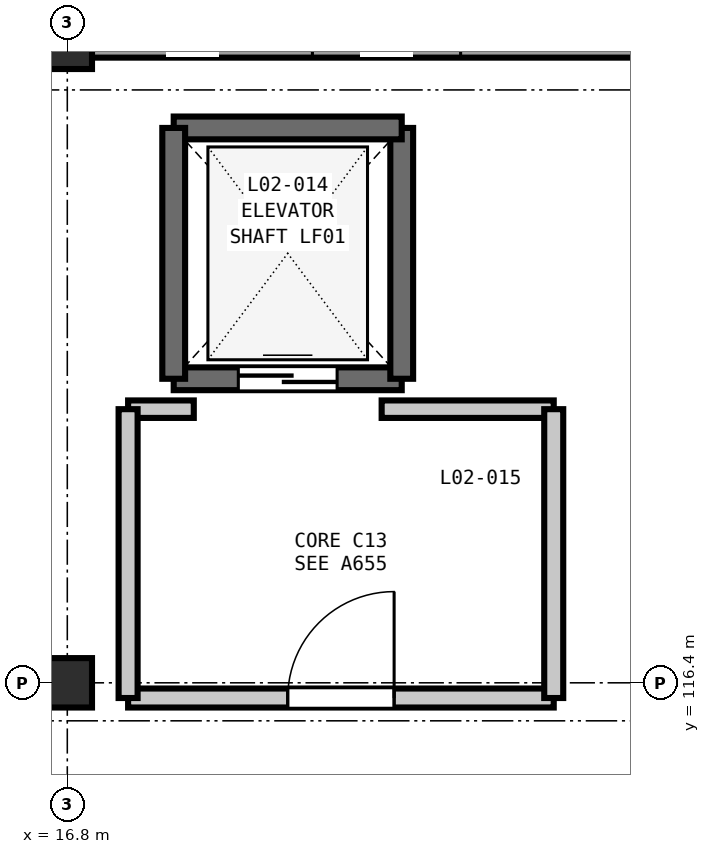
"""IFC4 building model, lengths in metres.
Left out: names, types, materials, properties, quantities, classifications, styles, units other than length and angle.
Written with IfcOpenShell. Run it as: python <this file> out.ifc"""

import sys

from ifc_helpers import new_model, si_unit, direction, frame, frame_2d, origin, origin_2d, place, context, subcontext, project, spatial, rectangle, extrude, element, fill, save


model = new_model("IFC4")
c1 = context("Model", 3, precision=1e-05, world=origin(), true_north=direction((0.0, 1.0)))
c2 = subcontext(c1, "Body", "Model", "MODEL_VIEW")
j1 = project(units=[si_unit("LENGTHUNIT", "METRE"), si_unit("PLANEANGLEUNIT", "RADIAN")], contexts=[c1])
p1 = place(None, origin())
s1 = spatial("IfcSite", under=j1, at=p1, CompositionType="ELEMENT")
p2 = place(p1, origin())
s2 = spatial("IfcBuilding", under=s1, at=p2, CompositionType="ELEMENT")
p3 = place(p2, frame((0.0, 0.0, 10.8)))
s3 = spatial("IfcBuildingStorey", under=s2, at=p3, CompositionType="ELEMENT", Elevation=10.8)
for number, where, z_axis, x_axis in (
    (1, (16.8, 116.4, 0.0), (0.0, 0.0, 1.0), (1.0, 0.0, 0.0)),
    (2, (16.8, 124.8, 0.0), (0.0, 0.0, 1.0), (1.0, 0.0, 0.0)),
):
    element("IfcColumn", number, at=place(p3, frame(where, z_axis=z_axis, x_axis=x_axis)), inside=s3, PredefinedType="COLUMN", context=c2, shape_type="SweptSolid", body=[
        extrude(rectangle(XDim=0.65, YDim=0.65, at=origin_2d()), origin(), (0.0, 0.0, 1.0), 5.4),
    ])
p4 = place(p3, frame((17.123, 124.8, 0.0), z_axis=(0.0, 0.0, 1.0), x_axis=(1.0, 0.0, 0.0)))
e3 = element("IfcWall", 3, at=p4, inside=s3, PredefinedType="SOLIDWALL", context=c2, shape_type="SweptSolid", body=[
    extrude(rectangle(XDim=7.754, YDim=0.35, at=frame_2d((3.877, 0.0))), origin(), (0.0, 0.0, 1.0), 4.68),
])
p5 = place(p4, frame((2.902, 0.0, 0.9)))
e4 = element("IfcOpeningElement", 4, at=p5, cuts=e3, PredefinedType="OPENING", context=c2, shape_type="SweptSolid", body=[
    extrude(rectangle(XDim=1.95, YDim=1.75, at=frame_2d((0.975, 0.875))), frame((0.0, 0.185, 0.0), z_axis=(0.0, -1.0, 0.0), x_axis=(1.0, 0.0, 0.0)), (0.0, 0.0, 1.0), 0.37),
])
p6 = place(p3, frame((18.2, 120.4, 0.0), z_axis=(0.0, 0.0, 1.0), x_axis=(1.0, 0.0, 0.0)))
e5 = element("IfcWall", 5, at=p6, inside=s3, PredefinedType="SHEAR", context=c2, shape_type="SweptSolid", body=[
    extrude(rectangle(XDim=3.0, YDim=0.3, at=frame_2d((1.5, 0.0))), origin(), (0.0, 0.0, 1.0), 5.4),
])
p7 = place(p6, frame((0.85, 0.0, 0.0)))
e6 = element("IfcOpeningElement", 6, at=p7, cuts=e5, PredefinedType="OPENING", context=c2, shape_type="SweptSolid", body=[
    extrude(rectangle(XDim=1.3, YDim=2.2, at=frame_2d((0.65, 1.1))), frame((0.0, 0.16, 0.0), z_axis=(0.0, -1.0, 0.0), x_axis=(1.0, 0.0, 0.0)), (0.0, 0.0, 1.0), 0.32),
])
p8 = place(p3, frame((21.2, 120.4, 0.0), z_axis=(0.0, 0.0, 1.0), x_axis=(0.0, 1.0, 0.0)))
e7 = element("IfcWall", 7, at=p8, inside=s3, PredefinedType="SHEAR", context=c2, shape_type="SweptSolid", body=[
    extrude(rectangle(XDim=3.3, YDim=0.3, at=frame_2d((1.65, 0.0))), origin(), (0.0, 0.0, 1.0), 5.4),
])
p9 = place(p3, frame((21.2, 123.7, 0.0), z_axis=(0.0, 0.0, 1.0), x_axis=(-1.0, 0.0, 0.0)))
e8 = element("IfcWall", 8, at=p9, inside=s3, PredefinedType="SHEAR", context=c2, shape_type="SweptSolid", body=[
    extrude(rectangle(XDim=3.0, YDim=0.3, at=frame_2d((1.5, 0.0))), origin(), (0.0, 0.0, 1.0), 5.4),
])
p10 = place(p3, frame((18.2, 123.7, 0.0), z_axis=(0.0, 0.0, 1.0), x_axis=(0.0, -1.0, 0.0)))
e9 = element("IfcWall", 9, at=p10, inside=s3, PredefinedType="SHEAR", context=c2, shape_type="SweptSolid", body=[
    extrude(rectangle(XDim=3.3, YDim=0.3, at=frame_2d((1.65, 0.0))), origin(), (0.0, 0.0, 1.0), 5.4),
])
p11 = place(p3, frame((17.6, 116.2, 0.0), z_axis=(0.0, 0.0, 1.0), x_axis=(1.0, 0.0, 0.0)))
e10 = element("IfcWall", 10, at=p11, inside=s3, PredefinedType="PARTITIONING", context=c2, shape_type="SweptSolid", body=[
    extrude(rectangle(XDim=5.6, YDim=0.25, at=frame_2d((2.8, 0.0))), origin(), (0.0, 0.0, 1.0), 4.735),
])
p12 = place(p11, frame((2.1, 0.0, 0.0)))
e11 = element("IfcOpeningElement", 11, at=p12, cuts=e10, PredefinedType="OPENING", context=c2, shape_type="SweptSolid", body=[
    extrude(rectangle(XDim=1.4, YDim=2.2, at=frame_2d((0.7, 1.1))), frame((0.0, 0.135, 0.0), z_axis=(0.0, -1.0, 0.0), x_axis=(1.0, 0.0, 0.0)), (0.0, 0.0, 1.0), 0.27),
])
p13 = place(p3, frame((20.936, 120.0, 0.0), z_axis=(0.0, 0.0, 1.0), x_axis=(1.0, 0.0, 0.0)))
e12 = element("IfcWall", 12, at=p13, inside=s3, PredefinedType="PARTITIONING", context=c2, shape_type="SweptSolid", body=[
    extrude(rectangle(XDim=2.264, YDim=0.23, at=frame_2d((1.132, 0.0))), origin(), (0.0, 0.0, 1.0), 5.07),
])
p14 = place(p3, frame((17.6, 120.0, 0.0), z_axis=(0.0, 0.0, 1.0), x_axis=(1.0, 0.0, 0.0)))
e13 = element("IfcWall", 13, at=p14, inside=s3, PredefinedType="PARTITIONING", context=c2, shape_type="SweptSolid", body=[
    extrude(rectangle(XDim=0.864, YDim=0.23, at=frame_2d((0.432, 0.0))), origin(), (0.0, 0.0, 1.0), 5.07),
])
for number, where, z_axis, x_axis in (
    (14, (17.6, 116.2, 0.0), (0.0, 0.0, 1.0), (0.0, 1.0, 0.0)),
    (15, (23.2, 116.2, 0.0), (0.0, 0.0, 1.0), (0.0, 1.0, 0.0)),
):
    element("IfcWall", number, at=place(p3, frame(where, z_axis=z_axis, x_axis=x_axis)), inside=s3, PredefinedType="PARTITIONING", context=c2, shape_type="SweptSolid", body=[
        extrude(rectangle(XDim=3.8, YDim=0.25, at=frame_2d((1.9, 0.0))), origin(), (0.0, 0.0, 1.0), 5.07),
    ])
p15 = place(p7, origin())
e16 = element("IfcDoor", 16, at=p15, inside=s3, OperationType="DOUBLE_DOOR_SLIDING", PredefinedType="DOOR", context=c2, shape_type="SweptSolid", body=[
    extrude(rectangle(XDim=1.3, YDim=2.2, at=frame_2d((0.65, 1.1))), frame((0.0, 0.025, 0.0), z_axis=(0.0, -1.0, 0.0), x_axis=(1.0, 0.0, 0.0)), (0.0, 0.0, 1.0), 0.05),
])
fill(e6, e16)
p16 = place(p12, origin())
e17 = element("IfcDoor", 17, at=p16, inside=s3, OperationType="SINGLE_SWING_RIGHT", PredefinedType="DOOR", context=c2, shape_type="SweptSolid", body=[
    extrude(rectangle(XDim=1.4, YDim=2.2, at=frame_2d((0.7, 1.1))), frame((0.0, 0.025, 0.0), z_axis=(0.0, -1.0, 0.0), x_axis=(1.0, 0.0, 0.0)), (0.0, 0.0, 1.0), 0.05),
])
fill(e11, e17)
save(model, sys.argv[1])
